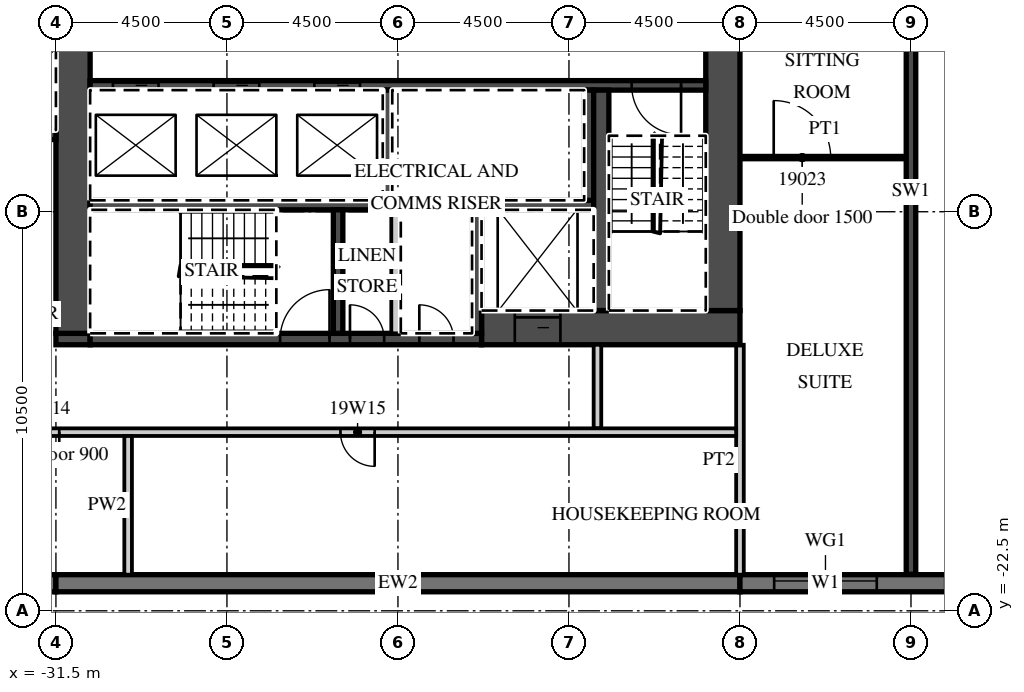
"""IFC4 building model, lengths in metres.
Left out: names, types, materials, properties, quantities, classifications, styles, units other than length and angle.
Written with IfcOpenShell. Run it as: python <this file> out.ifc"""

import sys

from ifc_helpers import new_model, si_unit, direction, frame, frame_2d, origin, place, context, subcontext, project, spatial, rectangle, extrude, element, fill, save


model = new_model("IFC4")
c1 = context("Model", 3, precision=1e-05, world=origin(), true_north=direction((0.0, 1.0)))
c2 = subcontext(c1, "Body", "Model", "MODEL_VIEW")
j1 = project(units=[si_unit("LENGTHUNIT", "METRE"), si_unit("PLANEANGLEUNIT", "RADIAN")], contexts=[c1])
p1 = place(None, origin())
s1 = spatial("IfcSite", under=j1, at=p1, CompositionType="ELEMENT")
p2 = place(p1, origin())
s2 = spatial("IfcBuilding", under=s1, at=p2, CompositionType="ELEMENT")
p3 = place(p2, frame((0.0, 0.0, 93.0)))
s3 = spatial("IfcBuildingStorey", under=s2, at=p3, CompositionType="ELEMENT", Elevation=93.0)
p4 = place(p3, frame((-9.0, -21.54, 0.0), z_axis=(0.0, 0.0, 1.0), x_axis=(0.0, 1.0, 0.0)))
e1 = element("IfcWall", 1, at=p4, inside=s3, PredefinedType="SHEAR", context=c2, shape_type="SweptSolid", body=[
    extrude(rectangle(XDim=20.14, YDim=0.25, at=frame_2d((10.07, 0.0))), origin(), (0.0, 0.0, 1.0), 3.3),
])
p5 = place(p3, frame((-41.0, -21.775, 0.0), z_axis=(0.0, 0.0, 1.0), x_axis=(1.0, 0.0, 0.0)))
e2 = element("IfcWall", 2, at=p5, inside=s3, PredefinedType="SOLIDWALL", context=c2, shape_type="SweptSolid", body=[
    extrude(rectangle(XDim=9.5, YDim=0.45, at=frame_2d((4.75, 0.0))), origin(), (0.0, 0.0, 1.0), 3.02),
])
p6 = place(p3, frame((-31.5, -21.775, 0.0), z_axis=(0.0, 0.0, 1.0), x_axis=(1.0, 0.0, 0.0)))
e3 = element("IfcWall", 3, at=p6, inside=s3, PredefinedType="SOLIDWALL", context=c2, shape_type="SweptSolid", body=[
    extrude(rectangle(XDim=18.0, YDim=0.45, at=frame_2d((9.0, 0.0))), origin(), (0.0, 0.0, 1.0), 3.02),
])
p7 = place(p3, frame((-13.5, -21.775, 0.0), z_axis=(0.0, 0.0, 1.0), x_axis=(1.0, 0.0, 0.0)))
e4 = element("IfcWall", 4, at=p7, inside=s3, PredefinedType="SOLIDWALL", context=c2, shape_type="SweptSolid", body=[
    extrude(rectangle(XDim=54.5, YDim=0.45, at=frame_2d((27.25, 0.0))), origin(), (0.0, 0.0, 1.0), 3.02),
])
p8 = place(p7, frame((0.9, 0.0, 0.45)))
e5 = element("IfcOpeningElement", 5, at=p8, cuts=e4, PredefinedType="OPENING", context=c2, shape_type="SweptSolid", body=[
    extrude(rectangle(XDim=2.7, YDim=2.25, at=frame_2d((1.35, 1.125))), frame((0.0, 0.235, 0.0), z_axis=(0.0, -1.0, 0.0), x_axis=(1.0, 0.0, 0.0)), (0.0, 0.0, 1.0), 0.47),
])
p9 = place(p7, frame((5.4, 0.0, 0.45)))
e6 = element("IfcOpeningElement", 6, at=p9, cuts=e4, PredefinedType="OPENING", context=c2, shape_type="SweptSolid", body=[
    extrude(rectangle(XDim=2.7, YDim=2.25, at=frame_2d((1.35, 1.125))), frame((0.0, 0.235, 0.0), z_axis=(0.0, -1.0, 0.0), x_axis=(1.0, 0.0, 0.0)), (0.0, 0.0, 1.0), 0.47),
])
p10 = place(p7, frame((9.9, 0.0, 0.45)))
e7 = element("IfcOpeningElement", 7, at=p10, cuts=e4, PredefinedType="OPENING", context=c2, shape_type="SweptSolid", body=[
    extrude(rectangle(XDim=2.7, YDim=2.25, at=frame_2d((1.35, 1.125))), frame((0.0, 0.235, 0.0), z_axis=(0.0, -1.0, 0.0), x_axis=(1.0, 0.0, 0.0)), (0.0, 0.0, 1.0), 0.47),
])
p11 = place(p7, frame((14.4, 0.0, 0.45)))
e8 = element("IfcOpeningElement", 8, at=p11, cuts=e4, PredefinedType="OPENING", context=c2, shape_type="SweptSolid", body=[
    extrude(rectangle(XDim=2.7, YDim=2.25, at=frame_2d((1.35, 1.125))), frame((0.0, 0.235, 0.0), z_axis=(0.0, -1.0, 0.0), x_axis=(1.0, 0.0, 0.0)), (0.0, 0.0, 1.0), 0.47),
])
p12 = place(p7, frame((18.9, 0.0, 0.45)))
e9 = element("IfcOpeningElement", 9, at=p12, cuts=e4, PredefinedType="OPENING", context=c2, shape_type="SweptSolid", body=[
    extrude(rectangle(XDim=2.7, YDim=2.25, at=frame_2d((1.35, 1.125))), frame((0.0, 0.235, 0.0), z_axis=(0.0, -1.0, 0.0), x_axis=(1.0, 0.0, 0.0)), (0.0, 0.0, 1.0), 0.47),
])
p13 = place(p7, frame((23.4, 0.0, 0.45)))
e10 = element("IfcOpeningElement", 10, at=p13, cuts=e4, PredefinedType="OPENING", context=c2, shape_type="SweptSolid", body=[
    extrude(rectangle(XDim=2.7, YDim=2.25, at=frame_2d((1.35, 1.125))), frame((0.0, 0.235, 0.0), z_axis=(0.0, -1.0, 0.0), x_axis=(1.0, 0.0, 0.0)), (0.0, 0.0, 1.0), 0.47),
])
p14 = place(p7, frame((27.9, 0.0, 0.45)))
e11 = element("IfcOpeningElement", 11, at=p14, cuts=e4, PredefinedType="OPENING", context=c2, shape_type="SweptSolid", body=[
    extrude(rectangle(XDim=2.7, YDim=2.25, at=frame_2d((1.35, 1.125))), frame((0.0, 0.235, 0.0), z_axis=(0.0, -1.0, 0.0), x_axis=(1.0, 0.0, 0.0)), (0.0, 0.0, 1.0), 0.47),
])
p15 = place(p7, frame((32.4, 0.0, 0.45)))
e12 = element("IfcOpeningElement", 12, at=p15, cuts=e4, PredefinedType="OPENING", context=c2, shape_type="SweptSolid", body=[
    extrude(rectangle(XDim=2.7, YDim=2.25, at=frame_2d((1.35, 1.125))), frame((0.0, 0.235, 0.0), z_axis=(0.0, -1.0, 0.0), x_axis=(1.0, 0.0, 0.0)), (0.0, 0.0, 1.0), 0.47),
])
p16 = place(p7, frame((36.9, 0.0, 0.45)))
e13 = element("IfcOpeningElement", 13, at=p16, cuts=e4, PredefinedType="OPENING", context=c2, shape_type="SweptSolid", body=[
    extrude(rectangle(XDim=2.7, YDim=2.25, at=frame_2d((1.35, 1.125))), frame((0.0, 0.235, 0.0), z_axis=(0.0, -1.0, 0.0), x_axis=(1.0, 0.0, 0.0)), (0.0, 0.0, 1.0), 0.47),
])
p17 = place(p7, frame((41.4, 0.0, 0.45)))
e14 = element("IfcOpeningElement", 14, at=p17, cuts=e4, PredefinedType="OPENING", context=c2, shape_type="SweptSolid", body=[
    extrude(rectangle(XDim=2.7, YDim=2.25, at=frame_2d((1.35, 1.125))), frame((0.0, 0.235, 0.0), z_axis=(0.0, -1.0, 0.0), x_axis=(1.0, 0.0, 0.0)), (0.0, 0.0, 1.0), 0.47),
])
p18 = place(p7, frame((45.9, 0.0, 0.45)))
e15 = element("IfcOpeningElement", 15, at=p18, cuts=e4, PredefinedType="OPENING", context=c2, shape_type="SweptSolid", body=[
    extrude(rectangle(XDim=2.7, YDim=2.25, at=frame_2d((1.35, 1.125))), frame((0.0, 0.235, 0.0), z_axis=(0.0, -1.0, 0.0), x_axis=(1.0, 0.0, 0.0)), (0.0, 0.0, 1.0), 0.47),
])
p19 = place(p7, frame((50.4, 0.0, 0.45)))
e16 = element("IfcOpeningElement", 16, at=p19, cuts=e4, PredefinedType="OPENING", context=c2, shape_type="SweptSolid", body=[
    extrude(rectangle(XDim=2.7, YDim=2.25, at=frame_2d((1.35, 1.125))), frame((0.0, 0.235, 0.0), z_axis=(0.0, -1.0, 0.0), x_axis=(1.0, 0.0, 0.0)), (0.0, 0.0, 1.0), 0.47),
])
p20 = place(p3, frame((-13.5, -21.55, 0.0), z_axis=(0.0, 0.0, 1.0), x_axis=(0.0, 1.0, 0.0)))
e17 = element("IfcWall", 17, at=p20, inside=s3, PredefinedType="PARTITIONING", context=c2, shape_type="SweptSolid", body=[
    extrude(rectangle(XDim=6.05, YDim=0.2, at=frame_2d((3.025, 0.0))), origin(), (0.0, 0.0, 1.0), 3.02),
])
p21 = place(p3, frame((-13.4, -10.575, 0.0), z_axis=(0.0, 0.0, 1.0), x_axis=(1.0, 0.0, 0.0)))
e18 = element("IfcWall", 18, at=p21, inside=s3, PredefinedType="PARTITIONING", context=c2, shape_type="SweptSolid", body=[
    extrude(rectangle(XDim=4.275, YDim=0.1, at=frame_2d((2.137, 0.0))), origin(), (0.0, 0.0, 1.0), 3.02),
])
p22 = place(p21, frame((0.788, 0.0, 0.0)))
e19 = element("IfcOpeningElement", 19, at=p22, cuts=e18, PredefinedType="OPENING", context=c2, shape_type="SweptSolid", body=[
    extrude(rectangle(XDim=1.5, YDim=2.1, at=frame_2d((0.75, 1.05))), frame((0.0, 0.06, 0.0), z_axis=(0.0, -1.0, 0.0), x_axis=(1.0, 0.0, 0.0)), (0.0, 0.0, 1.0), 0.12),
])
p23 = place(p3, frame((-20.3, -15.05, 0.0), z_axis=(0.0, 0.0, 1.0), x_axis=(1.0, 0.0, 0.0)))
e20 = element("IfcWall", 20, at=p23, inside=s3, PredefinedType="SHEAR", context=c2, shape_type="SweptSolid", body=[
    extrude(rectangle(XDim=6.8, YDim=0.9, at=frame_2d((3.4, 0.0))), origin(), (0.0, 0.0, 1.0), 3.02),
])
p24 = place(p23, frame((0.875, 0.0, 0.0)))
e21 = element("IfcOpeningElement", 21, at=p24, cuts=e20, PredefinedType="OPENING", context=c2, shape_type="SweptSolid", body=[
    extrude(rectangle(XDim=1.2, YDim=2.1, at=frame_2d((0.6, 1.05))), frame((0.0, 0.46, 0.0), z_axis=(0.0, -1.0, 0.0), x_axis=(1.0, 0.0, 0.0)), (0.0, 0.0, 1.0), 0.92),
])
p25 = place(p3, frame((-31.5, -15.35, 0.0), z_axis=(0.0, 0.0, 1.0), x_axis=(1.0, 0.0, 0.0)))
e22 = element("IfcWall", 22, at=p25, inside=s3, PredefinedType="SHEAR", context=c2, shape_type="SweptSolid", body=[
    extrude(rectangle(XDim=0.9, YDim=0.3, at=frame_2d((0.45, 0.0))), origin(), (0.0, 0.0, 1.0), 3.02),
])
p26 = place(p3, frame((-30.6, -15.35, 0.0), z_axis=(0.0, 0.0, 1.0), x_axis=(1.0, 0.0, 0.0)))
e23 = element("IfcWall", 23, at=p26, inside=s3, PredefinedType="SHEAR", context=c2, shape_type="SweptSolid", body=[
    extrude(rectangle(XDim=10.3, YDim=0.3, at=frame_2d((5.15, 0.0))), origin(), (0.0, 0.0, 1.0), 3.02),
])
p27 = place(p26, frame((5.0, 0.0, 0.0)))
e24 = element("IfcOpeningElement", 24, at=p27, cuts=e23, PredefinedType="OPENING", context=c2, shape_type="SweptSolid", body=[
    extrude(rectangle(XDim=1.3, YDim=2.1, at=frame_2d((0.65, 1.05))), frame((0.0, 0.16, 0.0), z_axis=(0.0, -1.0, 0.0), x_axis=(1.0, 0.0, 0.0)), (0.0, 0.0, 1.0), 0.32),
])
p28 = place(p26, frame((6.837, 0.0, 0.0)))
e25 = element("IfcOpeningElement", 25, at=p28, cuts=e23, PredefinedType="OPENING", context=c2, shape_type="SweptSolid", body=[
    extrude(rectangle(XDim=0.9, YDim=2.1, at=frame_2d((0.45, 1.05))), frame((0.0, 0.16, 0.0), z_axis=(0.0, -1.0, 0.0), x_axis=(1.0, 0.0, 0.0)), (0.0, 0.0, 1.0), 0.32),
])
p29 = place(p26, frame((8.663, 0.0, 0.0)))
e26 = element("IfcOpeningElement", 26, at=p29, cuts=e23, PredefinedType="OPENING", context=c2, shape_type="SweptSolid", body=[
    extrude(rectangle(XDim=0.9, YDim=2.1, at=frame_2d((0.45, 1.05))), frame((0.0, 0.16, 0.0), z_axis=(0.0, -1.0, 0.0), x_axis=(1.0, 0.0, 0.0)), (0.0, 0.0, 1.0), 0.32),
])
p30 = place(p3, frame((-31.05, -15.2, 0.0), z_axis=(0.0, 0.0, 1.0), x_axis=(0.0, 1.0, 0.0)))
e27 = element("IfcWall", 27, at=p30, inside=s3, PredefinedType="SHEAR", context=c2, shape_type="SweptSolid", body=[
    extrude(rectangle(XDim=12.8, YDim=0.9, at=frame_2d((6.4, 0.0))), origin(), (0.0, 0.0, 1.0), 3.02),
])
p31 = place(p30, frame((11.5, 0.0, 0.0)))
e28 = element("IfcOpeningElement", 28, at=p31, cuts=e27, PredefinedType="OPENING", context=c2, shape_type="SweptSolid", body=[
    extrude(rectangle(XDim=1.1, YDim=2.1, at=frame_2d((0.55, 1.05))), frame((0.0, 0.46, 0.0), z_axis=(0.0, -1.0, 0.0), x_axis=(1.0, 0.0, 0.0)), (0.0, 0.0, 1.0), 0.92),
])
p32 = place(p3, frame((-13.95, -14.6, 0.0), z_axis=(0.0, 0.0, 1.0), x_axis=(0.0, 1.0, 0.0)))
e29 = element("IfcWall", 29, at=p32, inside=s3, PredefinedType="SHEAR", context=c2, shape_type="SweptSolid", body=[
    extrude(rectangle(XDim=12.2, YDim=0.9, at=frame_2d((6.1, 0.0))), origin(), (0.0, 0.0, 1.0), 3.02),
])
p33 = place(p3, frame((-30.6, -8.675, 0.0), z_axis=(0.0, 0.0, 1.0), x_axis=(1.0, 0.0, 0.0)))
e30 = element("IfcWall", 30, at=p33, inside=s3, PredefinedType="SHEAR", context=c2, shape_type="SweptSolid", body=[
    extrude(rectangle(XDim=16.2, YDim=0.25, at=frame_2d((8.1, 0.0))), origin(), (0.0, 0.0, 1.0), 3.02),
])
p34 = place(p33, frame((0.6, 0.0, 0.0)))
e31 = element("IfcOpeningElement", 31, at=p34, cuts=e30, PredefinedType="OPENING", context=c2, shape_type="SweptSolid", body=[
    extrude(rectangle(XDim=1.2, YDim=2.1, at=frame_2d((0.6, 1.05))), frame((0.0, 0.135, 0.0), z_axis=(0.0, -1.0, 0.0), x_axis=(1.0, 0.0, 0.0)), (0.0, 0.0, 1.0), 0.27),
])
p35 = place(p33, frame((3.25, 0.0, 0.0)))
e32 = element("IfcOpeningElement", 32, at=p35, cuts=e30, PredefinedType="OPENING", context=c2, shape_type="SweptSolid", body=[
    extrude(rectangle(XDim=1.2, YDim=2.1, at=frame_2d((0.6, 1.05))), frame((0.0, 0.135, 0.0), z_axis=(0.0, -1.0, 0.0), x_axis=(1.0, 0.0, 0.0)), (0.0, 0.0, 1.0), 0.27),
])
p36 = place(p33, frame((5.9, 0.0, 0.0)))
e33 = element("IfcOpeningElement", 33, at=p36, cuts=e30, PredefinedType="OPENING", context=c2, shape_type="SweptSolid", body=[
    extrude(rectangle(XDim=1.2, YDim=2.1, at=frame_2d((0.6, 1.05))), frame((0.0, 0.135, 0.0), z_axis=(0.0, -1.0, 0.0), x_axis=(1.0, 0.0, 0.0)), (0.0, 0.0, 1.0), 0.27),
])
p37 = place(p33, frame((14.25, 0.0, 0.0)))
e34 = element("IfcOpeningElement", 34, at=p37, cuts=e30, PredefinedType="OPENING", context=c2, shape_type="SweptSolid", body=[
    extrude(rectangle(XDim=1.3, YDim=2.1, at=frame_2d((0.65, 1.05))), frame((0.0, 0.135, 0.0), z_axis=(0.0, -1.0, 0.0), x_axis=(1.0, 0.0, 0.0)), (0.0, 0.0, 1.0), 0.27),
])
p38 = place(p3, frame((-30.6, -11.825, 0.0), z_axis=(0.0, 0.0, 1.0), x_axis=(1.0, 0.0, 0.0)))
e35 = element("IfcWall", 35, at=p38, inside=s3, PredefinedType="SHEAR", context=c2, shape_type="SweptSolid", body=[
    extrude(rectangle(XDim=13.25, YDim=0.25, at=frame_2d((6.625, 0.0))), origin(), (0.0, 0.0, 1.0), 3.02),
])
for number, where, z_axis, x_axis in (
    (36, (-17.475, -11.7, 0.0), (0.0, 0.0, 1.0), (0.0, 1.0, 0.0)),
    (37, (-22.775, -11.7, 0.0), (0.0, 0.0, 1.0), (0.0, 1.0, 0.0)),
):
    element("IfcWall", number, at=place(p3, frame(where, z_axis=z_axis, x_axis=x_axis)), inside=s3, PredefinedType="SHEAR", context=c2, shape_type="SweptSolid", body=[
        extrude(rectangle(XDim=2.9, YDim=0.25, at=frame_2d((1.45, 0.0))), origin(), (0.0, 0.0, 1.0), 3.02),
    ])
p39 = place(p3, frame((-17.15, -14.6, 0.0), z_axis=(0.0, 0.0, 1.0), x_axis=(0.0, 1.0, 0.0)))
e38 = element("IfcWall", 38, at=p39, inside=s3, PredefinedType="SHEAR", context=c2, shape_type="SweptSolid", body=[
    extrude(rectangle(XDim=5.8, YDim=0.4, at=frame_2d((2.9, 0.0))), origin(), (0.0, 0.0, 1.0), 3.02),
])
for number, where, z_axis, x_axis in (
    (39, (-20.425, -15.2, 0.0), (0.0, 0.0, 1.0), (0.0, 1.0, 0.0)),
    (40, (-24.075, -15.2, 0.0), (0.0, 0.0, 1.0), (0.0, 1.0, 0.0)),
):
    element("IfcWall", number, at=place(p3, frame(where, z_axis=z_axis, x_axis=x_axis)), inside=s3, PredefinedType="SHEAR", context=c2, shape_type="SweptSolid", body=[
        extrude(rectangle(XDim=3.25, YDim=0.25, at=frame_2d((1.625, 0.0))), origin(), (0.0, 0.0, 1.0), 3.02),
    ])
p40 = place(p3, frame((-22.55, -15.2, 0.0), z_axis=(0.0, 0.0, 1.0), x_axis=(0.0, 1.0, 0.0)))
e41 = element("IfcWall", 41, at=p40, inside=s3, PredefinedType="PARTITIONING", context=c2, shape_type="SweptSolid", body=[
    extrude(rectangle(XDim=3.25, YDim=0.25, at=frame_2d((1.625, 0.0))), origin(), (0.0, 0.0, 1.0), 3.02),
])
p41 = place(p3, frame((-34.05, -9.975, 0.0), z_axis=(0.0, 0.0, 1.0), x_axis=(1.0, 0.0, 0.0)))
e42 = element("IfcWall", 42, at=p41, inside=s3, PredefinedType="SHEAR", context=c2, shape_type="SweptSolid", body=[
    extrude(rectangle(XDim=2.55, YDim=0.25, at=frame_2d((1.275, 0.0))), origin(), (0.0, 0.0, 1.0), 3.02),
])
p42 = place(p3, frame((-17.25, -17.7, 0.0), z_axis=(0.0, 0.0, 1.0), x_axis=(0.0, 1.0, 0.0)))
e43 = element("IfcWall", 43, at=p42, inside=s3, PredefinedType="PARTITIONING", context=c2, shape_type="SweptSolid", body=[
    extrude(rectangle(XDim=2.2, YDim=0.2, at=frame_2d((1.1, 0.0))), origin(), (0.0, 0.0, 1.0), 3.02),
])
p43 = place(p3, frame((-44.55, -17.8, 0.0), z_axis=(0.0, 0.0, 1.0), x_axis=(1.0, 0.0, 0.0)))
e44 = element("IfcWall", 44, at=p43, inside=s3, PredefinedType="PARTITIONING", context=c2, shape_type="SweptSolid", body=[
    extrude(rectangle(XDim=30.95, YDim=0.2, at=frame_2d((15.475, 0.0))), origin(), (0.0, 0.0, 1.0), 3.02),
])
p44 = place(p43, frame((12.238, 0.0, 0.0)))
e45 = element("IfcOpeningElement", 45, at=p44, cuts=e44, PredefinedType="OPENING", context=c2, shape_type="SweptSolid", body=[
    extrude(rectangle(XDim=0.9, YDim=2.1, at=frame_2d((0.45, 1.05))), frame((0.0, 0.11, 0.0), z_axis=(0.0, -1.0, 0.0), x_axis=(1.0, 0.0, 0.0)), (0.0, 0.0, 1.0), 0.22),
])
p45 = place(p43, frame((20.538, 0.0, 0.0)))
e46 = element("IfcOpeningElement", 46, at=p45, cuts=e44, PredefinedType="OPENING", context=c2, shape_type="SweptSolid", body=[
    extrude(rectangle(XDim=0.9, YDim=2.1, at=frame_2d((0.45, 1.05))), frame((0.0, 0.11, 0.0), z_axis=(0.0, -1.0, 0.0), x_axis=(1.0, 0.0, 0.0)), (0.0, 0.0, 1.0), 0.22),
])
p46 = place(p3, frame((-29.6, -21.55, 0.0), z_axis=(0.0, 0.0, 1.0), x_axis=(0.0, 1.0, 0.0)))
e47 = element("IfcWall", 47, at=p46, inside=s3, PredefinedType="PARTITIONING", context=c2, shape_type="SweptSolid", body=[
    extrude(rectangle(XDim=3.65, YDim=0.2, at=frame_2d((1.825, 0.0))), origin(), (0.0, 0.0, 1.0), 3.02),
])
p47 = place(p8, origin())
e48 = element("IfcWindow", 48, at=p47, inside=s3, PartitioningType="SINGLE_PANEL", PredefinedType="WINDOW", context=c2, shape_type="SweptSolid", body=[
    extrude(rectangle(XDim=2.7, YDim=2.25, at=frame_2d((1.35, 1.125))), frame((0.0, 0.09, 0.0), z_axis=(0.0, -1.0, 0.0), x_axis=(1.0, 0.0, 0.0)), (0.0, 0.0, 1.0), 0.06),
])
fill(e5, e48)
p48 = place(p22, origin())
e49 = element("IfcDoor", 49, at=p48, inside=s3, OperationType="SINGLE_SWING_LEFT", PredefinedType="DOOR", context=c2, shape_type="SweptSolid", body=[
    extrude(rectangle(XDim=1.5, YDim=2.1, at=frame_2d((0.75, 1.05))), frame((0.0, 0.025, 0.0), z_axis=(0.0, -1.0, 0.0), x_axis=(1.0, 0.0, 0.0)), (0.0, 0.0, 1.0), 0.05),
])
fill(e19, e49)
p49 = place(p34, origin())
e50 = element("IfcDoor", 50, at=p49, inside=s3, OperationType="SLIDING_TO_LEFT", PredefinedType="DOOR", context=c2, shape_type="SweptSolid", body=[
    extrude(rectangle(XDim=1.2, YDim=2.1, at=frame_2d((0.6, 1.05))), frame((0.0, 0.025, 0.0), z_axis=(0.0, -1.0, 0.0), x_axis=(1.0, 0.0, 0.0)), (0.0, 0.0, 1.0), 0.05),
])
fill(e31, e50)
p50 = place(p35, origin())
e51 = element("IfcDoor", 51, at=p50, inside=s3, OperationType="SLIDING_TO_RIGHT", PredefinedType="DOOR", context=c2, shape_type="SweptSolid", body=[
    extrude(rectangle(XDim=1.2, YDim=2.1, at=frame_2d((0.6, 1.05))), frame((0.0, 0.025, 0.0), z_axis=(0.0, -1.0, 0.0), x_axis=(1.0, 0.0, 0.0)), (0.0, 0.0, 1.0), 0.05),
])
fill(e32, e51)
p51 = place(p36, origin())
e52 = element("IfcDoor", 52, at=p51, inside=s3, OperationType="SLIDING_TO_RIGHT", PredefinedType="DOOR", context=c2, shape_type="SweptSolid", body=[
    extrude(rectangle(XDim=1.2, YDim=2.1, at=frame_2d((0.6, 1.05))), frame((0.0, 0.025, 0.0), z_axis=(0.0, -1.0, 0.0), x_axis=(1.0, 0.0, 0.0)), (0.0, 0.0, 1.0), 0.05),
])
fill(e33, e52)
p52 = place(p24, origin())
e53 = element("IfcDoor", 53, at=p52, inside=s3, OperationType="SLIDING_TO_LEFT", PredefinedType="DOOR", context=c2, shape_type="SweptSolid", body=[
    extrude(rectangle(XDim=1.2, YDim=2.1, at=frame_2d((0.6, 1.05))), frame((0.0, 0.025, 0.0), z_axis=(0.0, -1.0, 0.0), x_axis=(1.0, 0.0, 0.0)), (0.0, 0.0, 1.0), 0.05),
])
fill(e21, e53)
p53 = place(p37, origin())
e54 = element("IfcDoor", 54, at=p53, inside=s3, OperationType="SINGLE_SWING_RIGHT", PredefinedType="DOOR", context=c2, shape_type="SweptSolid", body=[
    extrude(rectangle(XDim=1.3, YDim=2.1, at=frame_2d((0.65, 1.05))), frame((0.0, 0.025, 0.0), z_axis=(0.0, -1.0, 0.0), x_axis=(1.0, 0.0, 0.0)), (0.0, 0.0, 1.0), 0.05),
])
fill(e34, e54)
p54 = place(p27, origin())
e55 = element("IfcDoor", 55, at=p54, inside=s3, OperationType="SINGLE_SWING_RIGHT", PredefinedType="DOOR", context=c2, shape_type="SweptSolid", body=[
    extrude(rectangle(XDim=1.3, YDim=2.1, at=frame_2d((0.65, 1.05))), frame((0.0, 0.025, 0.0), z_axis=(0.0, -1.0, 0.0), x_axis=(1.0, 0.0, 0.0)), (0.0, 0.0, 1.0), 0.05),
])
fill(e24, e55)
p55 = place(p28, origin())
e56 = element("IfcDoor", 56, at=p55, inside=s3, OperationType="SINGLE_SWING_LEFT", PredefinedType="DOOR", context=c2, shape_type="SweptSolid", body=[
    extrude(rectangle(XDim=0.9, YDim=2.1, at=frame_2d((0.45, 1.05))), frame((0.0, 0.025, 0.0), z_axis=(0.0, -1.0, 0.0), x_axis=(1.0, 0.0, 0.0)), (0.0, 0.0, 1.0), 0.05),
])
fill(e25, e56)
p56 = place(p29, origin())
e57 = element("IfcDoor", 57, at=p56, inside=s3, OperationType="SINGLE_SWING_LEFT", PredefinedType="DOOR", context=c2, shape_type="SweptSolid", body=[
    extrude(rectangle(XDim=0.9, YDim=2.1, at=frame_2d((0.45, 1.05))), frame((0.0, 0.025, 0.0), z_axis=(0.0, -1.0, 0.0), x_axis=(1.0, 0.0, 0.0)), (0.0, 0.0, 1.0), 0.05),
])
fill(e26, e57)
p57 = place(p44, origin())
e58 = element("IfcDoor", 58, at=p57, inside=s3, OperationType="SINGLE_SWING_RIGHT", PredefinedType="DOOR", context=c2, shape_type="SweptSolid", body=[
    extrude(rectangle(XDim=0.9, YDim=2.1, at=frame_2d((0.45, 1.05))), frame((0.0, 0.025, 0.0), z_axis=(0.0, -1.0, 0.0), x_axis=(1.0, 0.0, 0.0)), (0.0, 0.0, 1.0), 0.05),
])
fill(e45, e58)
p58 = place(p45, origin())
e59 = element("IfcDoor", 59, at=p58, inside=s3, OperationType="SINGLE_SWING_RIGHT", PredefinedType="DOOR", context=c2, shape_type="SweptSolid", body=[
    extrude(rectangle(XDim=0.9, YDim=2.1, at=frame_2d((0.45, 1.05))), frame((0.0, 0.025, 0.0), z_axis=(0.0, -1.0, 0.0), x_axis=(1.0, 0.0, 0.0)), (0.0, 0.0, 1.0), 0.05),
])
fill(e46, e59)
save(model, sys.argv[1])
